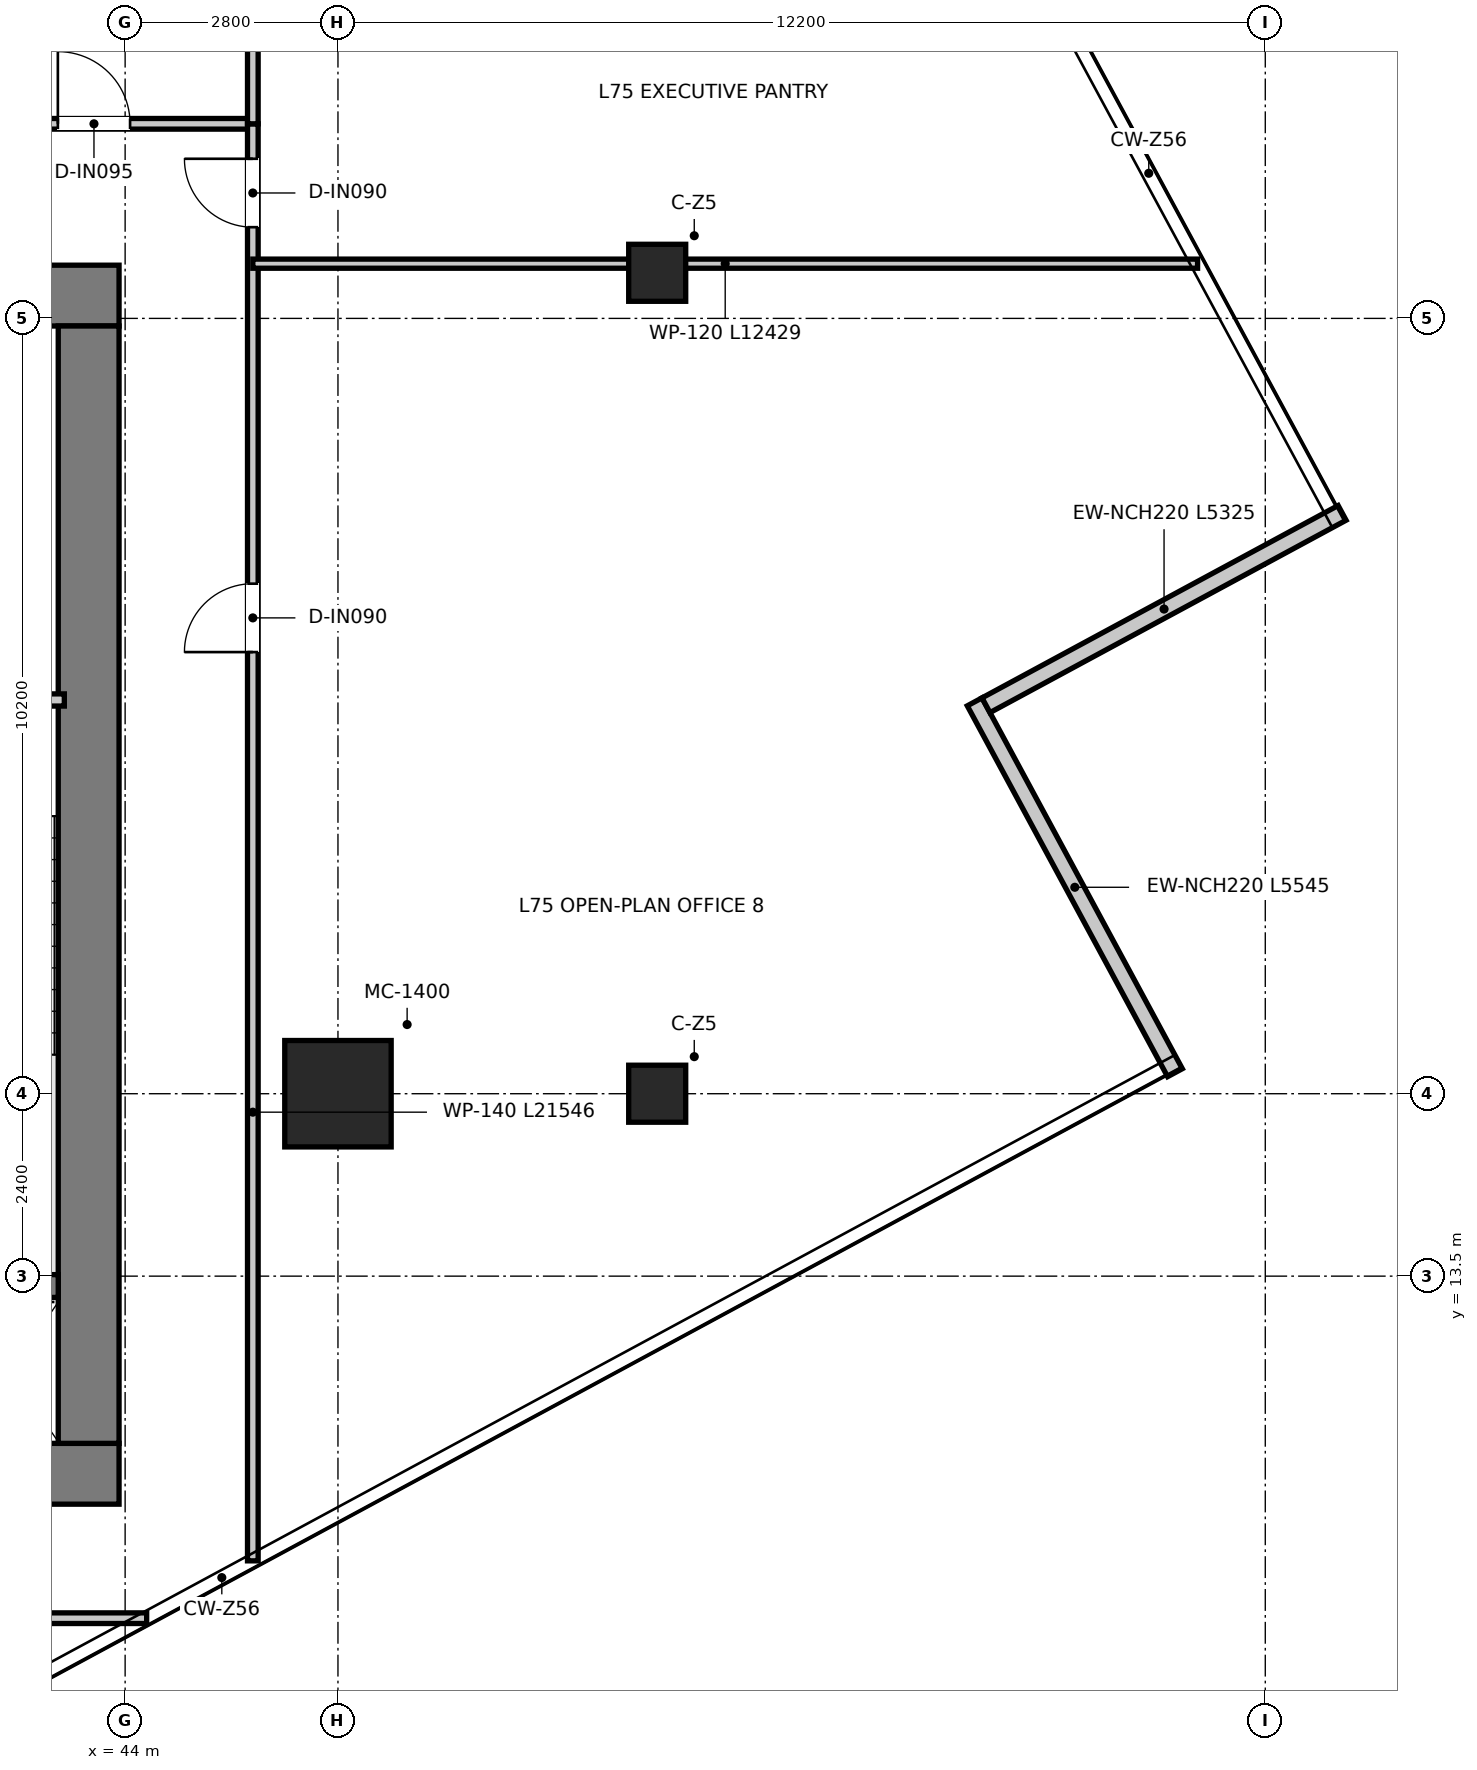
"""IFC4 building model, lengths in metres.
Left out: names, types, materials, properties, quantities, classifications, styles, units other than length and angle.
Written with IfcOpenShell. Run it as: python <this file> out.ifc"""

import sys

from ifc_helpers import new_model, si_unit, direction, frame, frame_2d, origin, origin_2d, place, context, subcontext, project, spatial, rectangle, extrude, source, transform, mapped, element, fill, save


model = new_model("IFC4")
c1 = context("Model", 3, precision=1e-05, world=origin(), true_north=direction((0.0, 1.0)))
c2 = subcontext(c1, "Body", "Model", "MODEL_VIEW")
j1 = project(units=[si_unit("LENGTHUNIT", "METRE"), si_unit("PLANEANGLEUNIT", "RADIAN")], contexts=[c1])
p1 = place(None, origin())
s1 = spatial("IfcSite", under=j1, at=p1, CompositionType="ELEMENT")
p2 = place(p1, origin())
s2 = spatial("IfcBuilding", under=s1, at=p2, CompositionType="ELEMENT")
p3 = place(p2, frame((0.0, 0.0, 306.9)))
s3 = spatial("IfcBuildingStorey", under=s2, at=p3, CompositionType="ELEMENT", Elevation=306.9)
p4 = place(p3, frame((28.08, 10.9, 0.0), z_axis=(0.0, 0.0, 1.0), x_axis=(1.0, 0.0, 0.0)))
e1 = element("IfcWall", 1, at=p4, inside=s3, PredefinedType="SHEAR", context=c2, shape_type="SweptSolid", body=[
    extrude(rectangle(XDim=15.84, YDim=0.8, at=frame_2d((7.92, 0.0))), origin(), (0.0, 0.0, 1.0), 3.95),
])
p5 = place(p3, frame((28.08, 26.4, 0.0), z_axis=(0.0, 0.0, 1.0), x_axis=(1.0, 0.0, 0.0)))
e2 = element("IfcWall", 2, at=p5, inside=s3, PredefinedType="SHEAR", context=c2, shape_type="SweptSolid", body=[
    extrude(rectangle(XDim=15.84, YDim=0.8, at=frame_2d((7.92, 0.0))), origin(), (0.0, 0.0, 1.0), 3.95),
])
p6 = place(p5, frame((7.22, 0.0, 0.0)))
e3 = element("IfcOpeningElement", 3, at=p6, cuts=e2, PredefinedType="OPENING", context=c2, shape_type="SweptSolid", body=[
    extrude(rectangle(XDim=1.4, YDim=2.2, at=frame_2d((0.7, 1.1))), frame((0.0, 0.41, 0.0), z_axis=(0.0, -1.0, 0.0), x_axis=(1.0, 0.0, 0.0)), (0.0, 0.0, 1.0), 0.82),
])
p7 = place(p5, frame((1.775, 0.0, 0.0)))
e4 = element("IfcOpeningElement", 4, at=p7, cuts=e2, PredefinedType="OPENING", context=c2, shape_type="SweptSolid", body=[
    extrude(rectangle(XDim=1.05, YDim=2.1, at=frame_2d((0.525, 1.05))), frame((0.0, 0.41, 0.0), z_axis=(0.0, -1.0, 0.0), x_axis=(1.0, 0.0, 0.0)), (0.0, 0.0, 1.0), 0.82),
])
p8 = place(p5, frame((13.015, 0.0, 0.0)))
e5 = element("IfcOpeningElement", 5, at=p8, cuts=e2, PredefinedType="OPENING", context=c2, shape_type="SweptSolid", body=[
    extrude(rectangle(XDim=1.05, YDim=2.1, at=frame_2d((0.525, 1.05))), frame((0.0, 0.41, 0.0), z_axis=(0.0, -1.0, 0.0), x_axis=(1.0, 0.0, 0.0)), (0.0, 0.0, 1.0), 0.82),
])
p9 = place(p3, frame((43.52, 11.3, 0.0), z_axis=(0.0, 0.0, 1.0), x_axis=(0.0, 1.0, 0.0)))
e6 = element("IfcWall", 6, at=p9, inside=s3, PredefinedType="SHEAR", context=c2, shape_type="SweptSolid", body=[
    extrude(rectangle(XDim=14.7, YDim=0.8, at=frame_2d((7.35, 0.0))), origin(), (0.0, 0.0, 1.0), 3.95),
])
p10 = place(p3, frame((40.02, 13.37, 0.0), z_axis=(0.0, 0.0, 1.0), x_axis=(1.0, 0.0, 0.0)))
e7 = element("IfcWall", 7, at=p10, inside=s3, PredefinedType="SHEAR", context=c2, shape_type="SweptSolid", body=[
    extrude(rectangle(XDim=3.1, YDim=0.3, at=frame_2d((1.55, 0.0))), origin(), (0.0, 0.0, 1.0), 3.95),
])
m1 = source(origin(), c2, "Body", "SweptSolid", [
    extrude(rectangle(XDim=1.4, YDim=1.4, at=origin_2d()), origin(), (0.0, 0.0, 1.0), 3.95),
])
p11 = place(p3, frame((46.8, 15.9, 0.0), z_axis=(0.0, 0.0, 1.0), x_axis=(1.0, 0.0, 0.0)))
e8 = element("IfcColumn", 8, at=p11, inside=s3, PredefinedType="USERDEFINED", context=c2, shape_type="MappedRepresentation", body=[
    mapped(m1, transform((0.0, 0.0, 0.0), x_axis=(1.0, 0.0, 0.0), y_axis=(0.0, 1.0, 0.0), z_axis=(0.0, 0.0, 1.0), scale=1.0)),
])
m2 = source(origin(), c2, "Body", "SweptSolid", [
    extrude(rectangle(XDim=0.75, YDim=0.75, at=origin_2d()), origin(), (0.0, 0.0, 1.0), 3.95),
])
for number, where, z_axis, x_axis in (
    (9, (51.0, 26.7, 0.0), (0.0, 0.0, 1.0), (1.0, 0.0, 0.0)),
    (10, (51.0, 15.9, 0.0), (0.0, 0.0, 1.0), (1.0, 0.0, 0.0)),
):
    element("IfcColumn", number, at=place(p3, frame(where, z_axis=z_axis, x_axis=x_axis)), inside=s3, PredefinedType="COLUMN", context=c2, shape_type="MappedRepresentation", body=[
        mapped(m2, transform((0.0, 0.0, 0.0), x_axis=(1.0, 0.0, 0.0), y_axis=(0.0, 1.0, 0.0), z_axis=(0.0, 0.0, 1.0), scale=1.0)),
    ])
p12 = place(p3, frame((57.812, 16.177, 0.0), z_axis=(0.0, 0.0, 1.0), x_axis=(-0.475257315172, 0.879846852796, 0.0)))
e11 = element("IfcWall", 11, at=p12, inside=s3, PredefinedType="ELEMENTEDWALL", context=c2, shape_type="SweptSolid", body=[
    extrude(rectangle(XDim=5.545, YDim=0.22, at=frame_2d((2.772, 0.0))), origin(), (0.0, 0.0, 1.0), 3.67),
])
p13 = place(p3, frame((55.326, 21.011, 0.0), z_axis=(0.0, 0.0, 1.0), x_axis=(0.879840215515, 0.475269602607, 0.0)))
e12 = element("IfcWall", 12, at=p13, inside=s3, PredefinedType="ELEMENTEDWALL", context=c2, shape_type="SweptSolid", body=[
    extrude(rectangle(XDim=5.325, YDim=0.22, at=frame_2d((2.663, 0.0))), origin(), (0.0, 0.0, 1.0), 3.67),
])
p14 = place(p3, frame((40.04, 21.08, 0.0), z_axis=(0.0, 0.0, 1.0), x_axis=(1.0, 0.0, 0.0)))
e13 = element("IfcWall", 13, at=p14, inside=s3, PredefinedType="PARTITIONING", context=c2, shape_type="SweptSolid", body=[
    extrude(rectangle(XDim=3.16, YDim=0.16, at=frame_2d((1.58, 0.0))), origin(), (0.0, 0.0, 1.0), 3.67),
])
p15 = place(p14, frame((1.055, 0.0, 0.0)))
e14 = element("IfcOpeningElement", 14, at=p15, cuts=e13, PredefinedType="OPENING", context=c2, shape_type="SweptSolid", body=[
    extrude(rectangle(XDim=1.05, YDim=2.1, at=frame_2d((0.525, 1.05))), frame((0.0, 0.09, 0.0), z_axis=(0.0, -1.0, 0.0), x_axis=(1.0, 0.0, 0.0)), (0.0, 0.0, 1.0), 0.18),
])
p16 = place(p3, frame((26.32, 28.66, 0.0), z_axis=(0.0, 0.0, 1.0), x_axis=(1.0, 0.0, 0.0)))
e15 = element("IfcWall", 15, at=p16, inside=s3, PredefinedType="PARTITIONING", context=c2, shape_type="SweptSolid", body=[
    extrude(rectangle(XDim=19.36, YDim=0.14, at=frame_2d((9.68, 0.0))), origin(), (0.0, 0.0, 1.0), 3.18),
])
p17 = place(p16, frame((1.615, 0.0, 0.0)))
e16 = element("IfcOpeningElement", 16, at=p17, cuts=e15, PredefinedType="OPENING", context=c2, shape_type="SweptSolid", body=[
    extrude(rectangle(XDim=0.95, YDim=2.1, at=frame_2d((0.475, 1.05))), frame((0.0, 0.08, 0.0), z_axis=(0.0, -1.0, 0.0), x_axis=(1.0, 0.0, 0.0)), (0.0, 0.0, 1.0), 0.16),
])
p18 = place(p16, frame((6.455, 0.0, 0.0)))
e17 = element("IfcOpeningElement", 17, at=p18, cuts=e15, PredefinedType="OPENING", context=c2, shape_type="SweptSolid", body=[
    extrude(rectangle(XDim=0.95, YDim=2.1, at=frame_2d((0.475, 1.05))), frame((0.0, 0.08, 0.0), z_axis=(0.0, -1.0, 0.0), x_axis=(1.0, 0.0, 0.0)), (0.0, 0.0, 1.0), 0.16),
])
p19 = place(p16, frame((11.955, 0.0, 0.0)))
e18 = element("IfcOpeningElement", 18, at=p19, cuts=e15, PredefinedType="OPENING", context=c2, shape_type="SweptSolid", body=[
    extrude(rectangle(XDim=0.95, YDim=2.1, at=frame_2d((0.475, 1.05))), frame((0.0, 0.08, 0.0), z_axis=(0.0, -1.0, 0.0), x_axis=(1.0, 0.0, 0.0)), (0.0, 0.0, 1.0), 0.16),
])
p20 = place(p16, frame((16.795, 0.0, 0.0)))
e19 = element("IfcOpeningElement", 19, at=p20, cuts=e15, PredefinedType="OPENING", context=c2, shape_type="SweptSolid", body=[
    extrude(rectangle(XDim=0.95, YDim=2.1, at=frame_2d((0.475, 1.05))), frame((0.0, 0.08, 0.0), z_axis=(0.0, -1.0, 0.0), x_axis=(1.0, 0.0, 0.0)), (0.0, 0.0, 1.0), 0.16),
])
p21 = place(p3, frame((45.68, 9.754, 0.0), z_axis=(0.0, 0.0, 1.0), x_axis=(0.0, 1.0, 0.0)))
e20 = element("IfcWall", 20, at=p21, inside=s3, PredefinedType="PARTITIONING", context=c2, shape_type="SweptSolid", body=[
    extrude(rectangle(XDim=18.906, YDim=0.14, at=frame_2d((9.453, 0.0))), origin(), (0.0, 0.0, 1.0), 3.13),
])
p22 = place(p21, frame((17.546, 0.0, 0.0)))
e21 = element("IfcOpeningElement", 21, at=p22, cuts=e20, PredefinedType="OPENING", context=c2, shape_type="SweptSolid", body=[
    extrude(rectangle(XDim=0.9, YDim=2.1, at=frame_2d((0.45, 1.05))), frame((0.0, 0.08, 0.0), z_axis=(0.0, -1.0, 0.0), x_axis=(1.0, 0.0, 0.0)), (0.0, 0.0, 1.0), 0.16),
])
p23 = place(p21, frame((11.956, 0.0, 0.0)))
e22 = element("IfcOpeningElement", 22, at=p23, cuts=e20, PredefinedType="OPENING", context=c2, shape_type="SweptSolid", body=[
    extrude(rectangle(XDim=0.9, YDim=2.1, at=frame_2d((0.45, 1.05))), frame((0.0, 0.08, 0.0), z_axis=(0.0, -1.0, 0.0), x_axis=(1.0, 0.0, 0.0)), (0.0, 0.0, 1.0), 0.16),
])
p24 = place(p3, frame((23.386, 9.0, 0.0), z_axis=(0.0, 0.0, 1.0), x_axis=(1.0, 0.0, 0.0)))
e23 = element("IfcWall", 23, at=p24, inside=s3, PredefinedType="PARTITIONING", context=c2, shape_type="SweptSolid", body=[
    extrude(rectangle(XDim=20.897, YDim=0.14, at=frame_2d((10.448, 0.0))), origin(), (0.0, 0.0, 1.0), 3.67),
])
p25 = place(p24, frame((8.189, 0.0, 0.0)))
e24 = element("IfcOpeningElement", 24, at=p25, cuts=e23, PredefinedType="OPENING", context=c2, shape_type="SweptSolid", body=[
    extrude(rectangle(XDim=0.85, YDim=2.1, at=frame_2d((0.425, 1.05))), frame((0.0, 0.08, 0.0), z_axis=(0.0, -1.0, 0.0), x_axis=(1.0, 0.0, 0.0)), (0.0, 0.0, 1.0), 0.16),
])
p26 = place(p24, frame((16.189, 0.0, 0.0)))
e25 = element("IfcOpeningElement", 25, at=p26, cuts=e23, PredefinedType="OPENING", context=c2, shape_type="SweptSolid", body=[
    extrude(rectangle(XDim=0.85, YDim=2.1, at=frame_2d((0.425, 1.05))), frame((0.0, 0.08, 0.0), z_axis=(0.0, -1.0, 0.0), x_axis=(1.0, 0.0, 0.0)), (0.0, 0.0, 1.0), 0.16),
])
p27 = place(p3, frame((45.68, 26.82, 0.0), z_axis=(0.0, 0.0, 1.0), x_axis=(1.0, 0.0, 0.0)))
e26 = element("IfcWall", 26, at=p27, inside=s3, PredefinedType="PARTITIONING", context=c2, shape_type="SweptSolid", body=[
    extrude(rectangle(XDim=12.429, YDim=0.12, at=frame_2d((6.215, 0.0))), origin(), (0.0, 0.0, 1.0), 3.13),
])
p28 = place(p3, frame((45.68, 28.66, 0.0), z_axis=(0.0, 0.0, 1.0), x_axis=(0.0, 1.0, 0.0)))
e27 = element("IfcWall", 27, at=p28, inside=s3, PredefinedType="PARTITIONING", context=c2, shape_type="SweptSolid", body=[
    extrude(rectangle(XDim=2.64, YDim=0.14, at=frame_2d((1.32, 0.0))), origin(), (0.0, 0.0, 1.0), 3.43),
])
p29 = place(p22, origin())
e28 = element("IfcDoor", 28, at=p29, inside=s3, OperationType="SINGLE_SWING_RIGHT", PredefinedType="DOOR", context=c2, shape_type="SweptSolid", body=[
    extrude(rectangle(XDim=0.9, YDim=2.1, at=frame_2d((0.45, 1.05))), frame((0.0, 0.025, 0.0), z_axis=(0.0, -1.0, 0.0), x_axis=(1.0, 0.0, 0.0)), (0.0, 0.0, 1.0), 0.05),
])
fill(e21, e28)
p30 = place(p20, origin())
e29 = element("IfcDoor", 29, at=p30, inside=s3, OperationType="SINGLE_SWING_LEFT", PredefinedType="DOOR", context=c2, shape_type="SweptSolid", body=[
    extrude(rectangle(XDim=0.95, YDim=2.1, at=frame_2d((0.475, 1.05))), frame((0.0, 0.025, 0.0), z_axis=(0.0, -1.0, 0.0), x_axis=(1.0, 0.0, 0.0)), (0.0, 0.0, 1.0), 0.05),
])
fill(e19, e29)
p31 = place(p23, origin())
e30 = element("IfcDoor", 30, at=p31, inside=s3, OperationType="SINGLE_SWING_LEFT", PredefinedType="DOOR", context=c2, shape_type="SweptSolid", body=[
    extrude(rectangle(XDim=0.9, YDim=2.1, at=frame_2d((0.45, 1.05))), frame((0.0, 0.025, 0.0), z_axis=(0.0, -1.0, 0.0), x_axis=(1.0, 0.0, 0.0)), (0.0, 0.0, 1.0), 0.05),
])
fill(e22, e30)
save(model, sys.argv[1])
